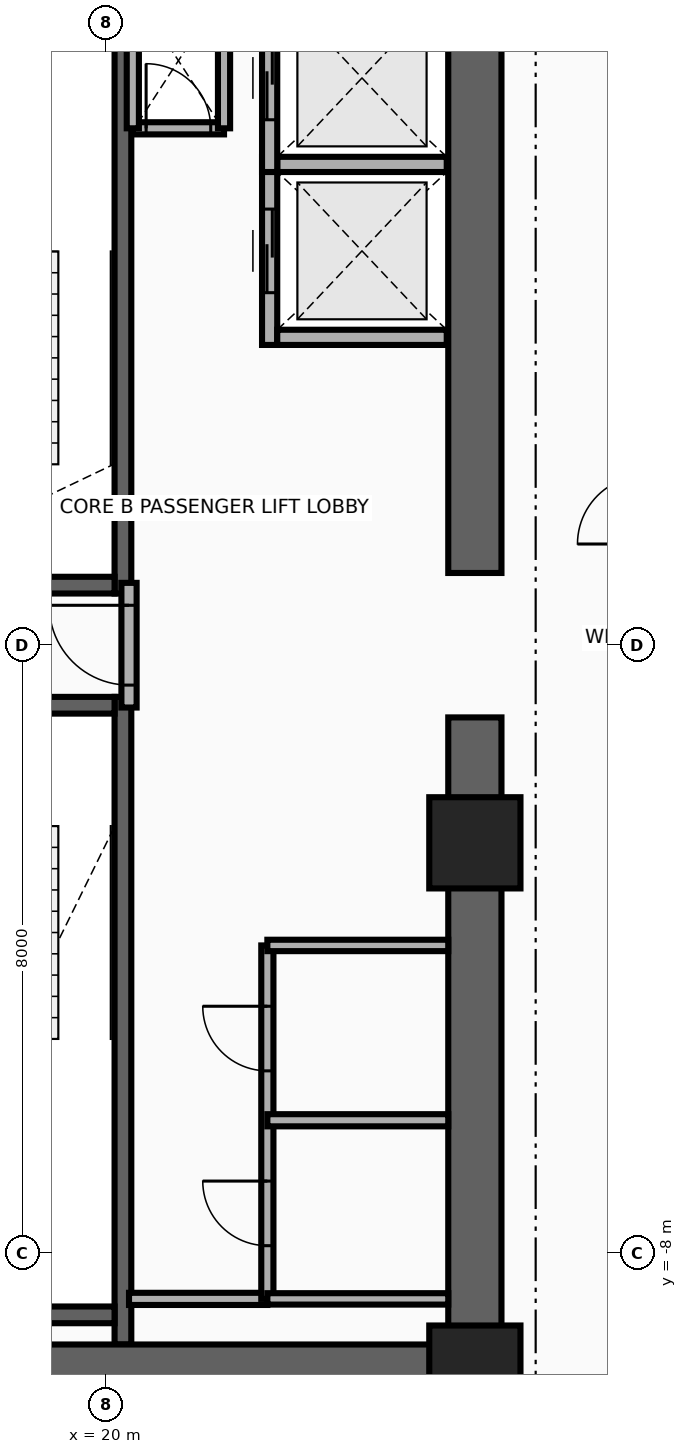
"""IFC4 building model, lengths in metres.
Left out: names, types, materials, properties, quantities, classifications, styles, units other than length and angle.
Written with IfcOpenShell. Run it as: python <this file> out.ifc"""

import sys

from ifc_helpers import new_model, si_unit, direction, frame, frame_2d, origin, origin_2d, place, context, subcontext, project, spatial, rectangle, extrude, source, transform, mapped, element, fill, save


model = new_model("IFC4")
c1 = context("Model", 3, precision=1e-05, world=origin(), true_north=direction((0.0, 1.0)))
c2 = subcontext(c1, "Body", "Model", "MODEL_VIEW")
j1 = project(units=[si_unit("LENGTHUNIT", "METRE"), si_unit("PLANEANGLEUNIT", "RADIAN")], contexts=[c1])
p1 = place(None, origin())
s1 = spatial("IfcSite", under=j1, at=p1, CompositionType="ELEMENT")
p2 = place(p1, origin())
s2 = spatial("IfcBuilding", under=s1, at=p2, CompositionType="ELEMENT")
p3 = place(p2, frame((0.0, 0.0, 139.0)))
s3 = spatial("IfcBuildingStorey", under=s2, at=p3, CompositionType="ELEMENT", Elevation=139.0)
p4 = place(p3, frame((20.22, 0.68, 0.0), z_axis=(0.0, 0.0, 1.0), x_axis=(0.0, 1.0, 0.0)))
e1 = element("IfcWall", 1, at=p4, inside=s3, PredefinedType="SHEAR", context=c2, shape_type="SweptSolid", body=[
    extrude(rectangle(XDim=8.52, YDim=0.22, at=frame_2d((4.26, 0.0))), origin(), (0.0, 0.0, 1.0), 3.46),
])
p5 = place(p3, frame((17.0, 0.79, 0.0), z_axis=(0.0, 0.0, 1.0), x_axis=(1.0, 0.0, 0.0)))
e2 = element("IfcWall", 2, at=p5, inside=s3, PredefinedType="SHEAR", context=c2, shape_type="SweptSolid", body=[
    extrude(rectangle(XDim=3.11, YDim=0.22, at=frame_2d((1.555, 0.0))), origin(), (0.0, 0.0, 1.0), 3.46),
])
p6 = place(p5, frame((0.95, 0.0, 0.0)))
e3 = element("IfcOpeningElement", 3, at=p6, cuts=e2, PredefinedType="OPENING", context=c2, shape_type="SweptSolid", body=[
    extrude(rectangle(XDim=1.1, YDim=2.15, at=frame_2d((0.55, 1.075))), frame((0.0, 0.125, 0.0), z_axis=(0.0, -1.0, 0.0), x_axis=(1.0, 0.0, 0.0)), (0.0, 0.0, 1.0), 0.25),
])
p7 = place(p3, frame((20.22, -9.2, 0.0), z_axis=(0.0, 0.0, 1.0), x_axis=(0.0, 1.0, 0.0)))
e4 = element("IfcWall", 4, at=p7, inside=s3, PredefinedType="SHEAR", context=c2, shape_type="SweptSolid", body=[
    extrude(rectangle(XDim=8.52, YDim=0.22, at=frame_2d((4.26, 0.0))), origin(), (0.0, 0.0, 1.0), 3.46),
])
p8 = place(p3, frame((17.0, -8.81, 0.0), z_axis=(0.0, 0.0, 1.0), x_axis=(1.0, 0.0, 0.0)))
e5 = element("IfcWall", 5, at=p8, inside=s3, PredefinedType="SHEAR", context=c2, shape_type="SweptSolid", body=[
    extrude(rectangle(XDim=3.11, YDim=0.22, at=frame_2d((1.555, 0.0))), origin(), (0.0, 0.0, 1.0), 3.46),
])
p9 = place(p3, frame((17.0, -0.79, 0.0), z_axis=(0.0, 0.0, 1.0), x_axis=(1.0, 0.0, 0.0)))
e6 = element("IfcWall", 6, at=p9, inside=s3, PredefinedType="SHEAR", context=c2, shape_type="SweptSolid", body=[
    extrude(rectangle(XDim=3.11, YDim=0.22, at=frame_2d((1.555, 0.0))), origin(), (0.0, 0.0, 1.0), 3.46),
])
p10 = place(p9, frame((0.95, 0.0, 0.0)))
e7 = element("IfcOpeningElement", 7, at=p10, cuts=e6, PredefinedType="OPENING", context=c2, shape_type="SweptSolid", body=[
    extrude(rectangle(XDim=1.1, YDim=2.15, at=frame_2d((0.55, 1.075))), frame((0.0, 0.125, 0.0), z_axis=(0.0, -1.0, 0.0), x_axis=(1.0, 0.0, 0.0)), (0.0, 0.0, 1.0), 0.25),
])
for number, where, z_axis, x_axis in (
    (8, (24.85, -9.9, 0.0), (0.0, 0.0, 1.0), (0.0, 1.0, 0.0)),
    (9, (24.85, 0.95, 0.0), (0.0, 0.0, 1.0), (0.0, 1.0, 0.0)),
):
    element("IfcWall", number, at=place(p3, frame(where, z_axis=z_axis, x_axis=x_axis)), inside=s3, PredefinedType="SHEAR", context=c2, shape_type="SweptSolid", body=[
        extrude(rectangle(XDim=8.95, YDim=0.7, at=frame_2d((4.475, 0.0))), origin(), (0.0, 0.0, 1.0), 3.46),
    ])
p11 = place(p3, frame((15.85, -9.55, 0.0), z_axis=(0.0, 0.0, 1.0), x_axis=(1.0, 0.0, 0.0)))
e10 = element("IfcWall", 10, at=p11, inside=s3, PredefinedType="SHEAR", context=c2, shape_type="SweptSolid", body=[
    extrude(rectangle(XDim=9.0, YDim=0.7, at=frame_2d((4.5, 0.0))), origin(), (0.0, 0.0, 1.0), 3.46),
])
m1 = source(origin(), c2, "Body", "SweptSolid", [
    extrude(rectangle(XDim=1.2, YDim=1.2, at=origin_2d()), origin(), (0.0, 0.0, 1.0), 3.7),
])
for number, where, z_axis, x_axis in (
    (11, (24.85, -9.55, 0.0), (0.0, 0.0, 1.0), (1.0, 0.0, 0.0)),
    (12, (24.85, -2.6, 0.0), (0.0, 0.0, 1.0), (1.0, 0.0, 0.0)),
):
    element("IfcColumn", number, at=place(p3, frame(where, z_axis=z_axis, x_axis=x_axis)), inside=s3, PredefinedType="COLUMN", context=c2, shape_type="MappedRepresentation", body=[
        mapped(m1, transform((0.0, 0.0, 0.0), x_axis=(1.0, 0.0, 0.0), y_axis=(0.0, 1.0, 0.0), z_axis=(0.0, 0.0, 1.0), scale=1.0)),
    ])
p12 = place(p3, frame((22.15, 3.95, 0.0), z_axis=(0.0, 0.0, 1.0), x_axis=(0.0, 1.0, 0.0)))
e13 = element("IfcWall", 13, at=p12, inside=s3, PredefinedType="MOVABLE", context=c2, shape_type="SweptSolid", body=[
    extrude(rectangle(XDim=2.475, YDim=0.2, at=frame_2d((1.238, 0.0))), origin(), (0.0, 0.0, 1.0), 3.46),
])
p13 = place(p12, frame((0.688, 0.0, 0.0)))
e14 = element("IfcOpeningElement", 14, at=p13, cuts=e13, PredefinedType="OPENING", context=c2, shape_type="SweptSolid", body=[
    extrude(rectangle(XDim=1.1, YDim=2.1, at=frame_2d((0.55, 1.05))), frame((0.0, 0.115, 0.0), z_axis=(0.0, -1.0, 0.0), x_axis=(1.0, 0.0, 0.0)), (0.0, 0.0, 1.0), 0.23),
])
for number, where, z_axis, x_axis in (
    (15, (22.25, 4.05, 0.0), (0.0, 0.0, 1.0), (1.0, 0.0, 0.0)),
    (16, (22.25, 6.325, 0.0), (0.0, 0.0, 1.0), (1.0, 0.0, 0.0)),
):
    element("IfcWall", number, at=place(p3, frame(where, z_axis=z_axis, x_axis=x_axis)), inside=s3, PredefinedType="MOVABLE", context=c2, shape_type="SweptSolid", body=[
        extrude(rectangle(XDim=2.23, YDim=0.2, at=frame_2d((1.115, 0.0))), origin(), (0.0, 0.0, 1.0), 2.245),
    ])
p14 = place(p3, frame((22.15, 6.225, 0.0), z_axis=(0.0, 0.0, 1.0), x_axis=(0.0, 1.0, 0.0)))
e17 = element("IfcWall", 17, at=p14, inside=s3, PredefinedType="MOVABLE", context=c2, shape_type="SweptSolid", body=[
    extrude(rectangle(XDim=2.475, YDim=0.2, at=frame_2d((1.237, 0.0))), origin(), (0.0, 0.0, 1.0), 3.46),
])
p15 = place(p14, frame((0.688, 0.0, 0.0)))
e18 = element("IfcOpeningElement", 18, at=p15, cuts=e17, PredefinedType="OPENING", context=c2, shape_type="SweptSolid", body=[
    extrude(rectangle(XDim=1.1, YDim=2.1, at=frame_2d((0.55, 1.05))), frame((0.0, 0.115, 0.0), z_axis=(0.0, -1.0, 0.0), x_axis=(1.0, 0.0, 0.0)), (0.0, 0.0, 1.0), 0.23),
])
p16 = place(p3, frame((20.3, -0.82, 0.0), z_axis=(0.0, 0.0, 1.0), x_axis=(0.0, 1.0, 0.0)))
e19 = element("IfcWall", 19, at=p16, inside=s3, PredefinedType="PARTITIONING", context=c2, shape_type="SweptSolid", body=[
    extrude(rectangle(XDim=1.64, YDim=0.2, at=frame_2d((0.82, 0.0))), origin(), (0.0, 0.0, 1.0), 3.46),
])
p17 = place(p16, frame((0.295, 0.0, 0.0)))
e20 = element("IfcOpeningElement", 20, at=p17, cuts=e19, PredefinedType="OPENING", context=c2, shape_type="SweptSolid", body=[
    extrude(rectangle(XDim=1.05, YDim=2.15, at=frame_2d((0.525, 1.075))), frame((0.0, 0.115, 0.0), z_axis=(0.0, -1.0, 0.0), x_axis=(1.0, 0.0, 0.0)), (0.0, 0.0, 1.0), 0.23),
])
p18 = place(p3, frame((20.35, 6.8, 0.0), z_axis=(0.0, 0.0, 1.0), x_axis=(1.0, 0.0, 0.0)))
e21 = element("IfcWall", 21, at=p18, inside=s3, PredefinedType="PARTITIONING", context=c2, shape_type="SweptSolid", body=[
    extrude(rectangle(XDim=1.2, YDim=0.16, at=frame_2d((0.6, 0.0))), origin(), (0.0, 0.0, 1.0), 3.46),
])
p19 = place(p18, frame((0.175, 0.0, 0.0)))
e22 = element("IfcOpeningElement", 22, at=p19, cuts=e21, PredefinedType="OPENING", context=c2, shape_type="SweptSolid", body=[
    extrude(rectangle(XDim=0.85, YDim=2.05, at=frame_2d((0.425, 1.025))), frame((0.0, 0.095, 0.0), z_axis=(0.0, -1.0, 0.0), x_axis=(1.0, 0.0, 0.0)), (0.0, 0.0, 1.0), 0.19),
])
for number, where, z_axis, x_axis in (
    (23, (21.55, 6.8, 0.0), (0.0, 0.0, 1.0), (0.0, 1.0, 0.0)),
    (24, (20.35, 6.8, 0.0), (0.0, 0.0, 1.0), (0.0, 1.0, 0.0)),
):
    element("IfcWall", number, at=place(p3, frame(where, z_axis=z_axis, x_axis=x_axis)), inside=s3, PredefinedType="PARTITIONING", context=c2, shape_type="SweptSolid", body=[
        extrude(rectangle(XDim=1.8, YDim=0.16, at=frame_2d((0.9, 0.0))), origin(), (0.0, 0.0, 1.0), 3.46),
    ])
p20 = place(p3, frame((20.3, -8.6, 0.0), z_axis=(0.0, 0.0, 1.0), x_axis=(1.0, 0.0, 0.0)))
e25 = element("IfcWall", 25, at=p20, inside=s3, PredefinedType="PARTITIONING", context=c2, shape_type="SweptSolid", body=[
    extrude(rectangle(XDim=1.82, YDim=0.16, at=frame_2d((0.91, 0.0))), origin(), (0.0, 0.0, 1.0), 3.46),
])
p21 = place(p3, frame((22.12, -8.6, 0.0), z_axis=(0.0, 0.0, 1.0), x_axis=(0.0, 1.0, 0.0)))
e26 = element("IfcWall", 26, at=p21, inside=s3, PredefinedType="PARTITIONING", context=c2, shape_type="SweptSolid", body=[
    extrude(rectangle(XDim=4.65, YDim=0.16, at=frame_2d((2.325, 0.0))), origin(), (0.0, 0.0, 1.0), 3.46),
])
p22 = place(p21, frame((0.7, 0.0, 0.0)))
e27 = element("IfcOpeningElement", 27, at=p22, cuts=e26, PredefinedType="OPENING", context=c2, shape_type="SweptSolid", body=[
    extrude(rectangle(XDim=0.85, YDim=2.05, at=frame_2d((0.425, 1.025))), frame((0.0, 0.095, 0.0), z_axis=(0.0, -1.0, 0.0), x_axis=(1.0, 0.0, 0.0)), (0.0, 0.0, 1.0), 0.19),
])
p23 = place(p21, frame((3.0, 0.0, 0.0)))
e28 = element("IfcOpeningElement", 28, at=p23, cuts=e26, PredefinedType="OPENING", context=c2, shape_type="SweptSolid", body=[
    extrude(rectangle(XDim=0.85, YDim=2.05, at=frame_2d((0.425, 1.025))), frame((0.0, 0.095, 0.0), z_axis=(0.0, -1.0, 0.0), x_axis=(1.0, 0.0, 0.0)), (0.0, 0.0, 1.0), 0.19),
])
for number, where, z_axis, x_axis in (
    (29, (22.12, -3.95, 0.0), (0.0, 0.0, 1.0), (1.0, 0.0, 0.0)),
    (30, (22.12, -8.6, 0.0), (0.0, 0.0, 1.0), (1.0, 0.0, 0.0)),
):
    element("IfcWall", number, at=place(p3, frame(where, z_axis=z_axis, x_axis=x_axis)), inside=s3, PredefinedType="PARTITIONING", context=c2, shape_type="SweptSolid", body=[
        extrude(rectangle(XDim=2.38, YDim=0.15, at=frame_2d((1.19, 0.0))), origin(), (0.0, 0.0, 1.0), 3.46),
    ])
p24 = place(p3, frame((22.12, -6.25, 0.0), z_axis=(0.0, 0.0, 1.0), x_axis=(1.0, 0.0, 0.0)))
e31 = element("IfcWall", 31, at=p24, inside=s3, PredefinedType="PARTITIONING", context=c2, shape_type="SweptSolid", body=[
    extrude(rectangle(XDim=2.38, YDim=0.16, at=frame_2d((1.19, 0.0))), origin(), (0.0, 0.0, 1.0), 3.46),
])
p25 = place(p13, origin())
e32 = element("IfcDoor", 32, at=p25, inside=s3, OperationType="DOUBLE_DOOR_SLIDING", PredefinedType="DOOR", context=c2, shape_type="SweptSolid", body=[
    extrude(rectangle(XDim=1.1, YDim=2.1, at=frame_2d((0.55, 1.05))), frame((0.0, 0.025, 0.0), z_axis=(0.0, -1.0, 0.0), x_axis=(1.0, 0.0, 0.0)), (0.0, 0.0, 1.0), 0.05),
])
fill(e14, e32)
p26 = place(p15, origin())
e33 = element("IfcDoor", 33, at=p26, inside=s3, OperationType="DOUBLE_DOOR_SLIDING", PredefinedType="DOOR", context=c2, shape_type="SweptSolid", body=[
    extrude(rectangle(XDim=1.1, YDim=2.1, at=frame_2d((0.55, 1.05))), frame((0.0, 0.025, 0.0), z_axis=(0.0, -1.0, 0.0), x_axis=(1.0, 0.0, 0.0)), (0.0, 0.0, 1.0), 0.05),
])
fill(e18, e33)
p27 = place(p17, origin())
e34 = element("IfcDoor", 34, at=p27, inside=s3, OperationType="SINGLE_SWING_RIGHT", PredefinedType="DOOR", context=c2, shape_type="SweptSolid", body=[
    extrude(rectangle(XDim=1.05, YDim=2.15, at=frame_2d((0.525, 1.075))), frame((0.0, 0.025, 0.0), z_axis=(0.0, -1.0, 0.0), x_axis=(1.0, 0.0, 0.0)), (0.0, 0.0, 1.0), 0.05),
])
fill(e20, e34)
p28 = place(p19, origin())
e35 = element("IfcDoor", 35, at=p28, inside=s3, OperationType="SINGLE_SWING_LEFT", PredefinedType="DOOR", context=c2, shape_type="SweptSolid", body=[
    extrude(rectangle(XDim=0.85, YDim=2.05, at=frame_2d((0.425, 1.025))), frame((0.0, 0.025, 0.0), z_axis=(0.0, -1.0, 0.0), x_axis=(1.0, 0.0, 0.0)), (0.0, 0.0, 1.0), 0.05),
])
fill(e22, e35)
p29 = place(p22, origin())
e36 = element("IfcDoor", 36, at=p29, inside=s3, OperationType="SINGLE_SWING_RIGHT", PredefinedType="DOOR", context=c2, shape_type="SweptSolid", body=[
    extrude(rectangle(XDim=0.85, YDim=2.05, at=frame_2d((0.425, 1.025))), frame((0.0, 0.025, 0.0), z_axis=(0.0, -1.0, 0.0), x_axis=(1.0, 0.0, 0.0)), (0.0, 0.0, 1.0), 0.05),
])
fill(e27, e36)
p30 = place(p23, origin())
e37 = element("IfcDoor", 37, at=p30, inside=s3, OperationType="SINGLE_SWING_LEFT", PredefinedType="DOOR", context=c2, shape_type="SweptSolid", body=[
    extrude(rectangle(XDim=0.85, YDim=2.05, at=frame_2d((0.425, 1.025))), frame((0.0, 0.025, 0.0), z_axis=(0.0, -1.0, 0.0), x_axis=(1.0, 0.0, 0.0)), (0.0, 0.0, 1.0), 0.05),
])
fill(e28, e37)
save(model, sys.argv[1])
